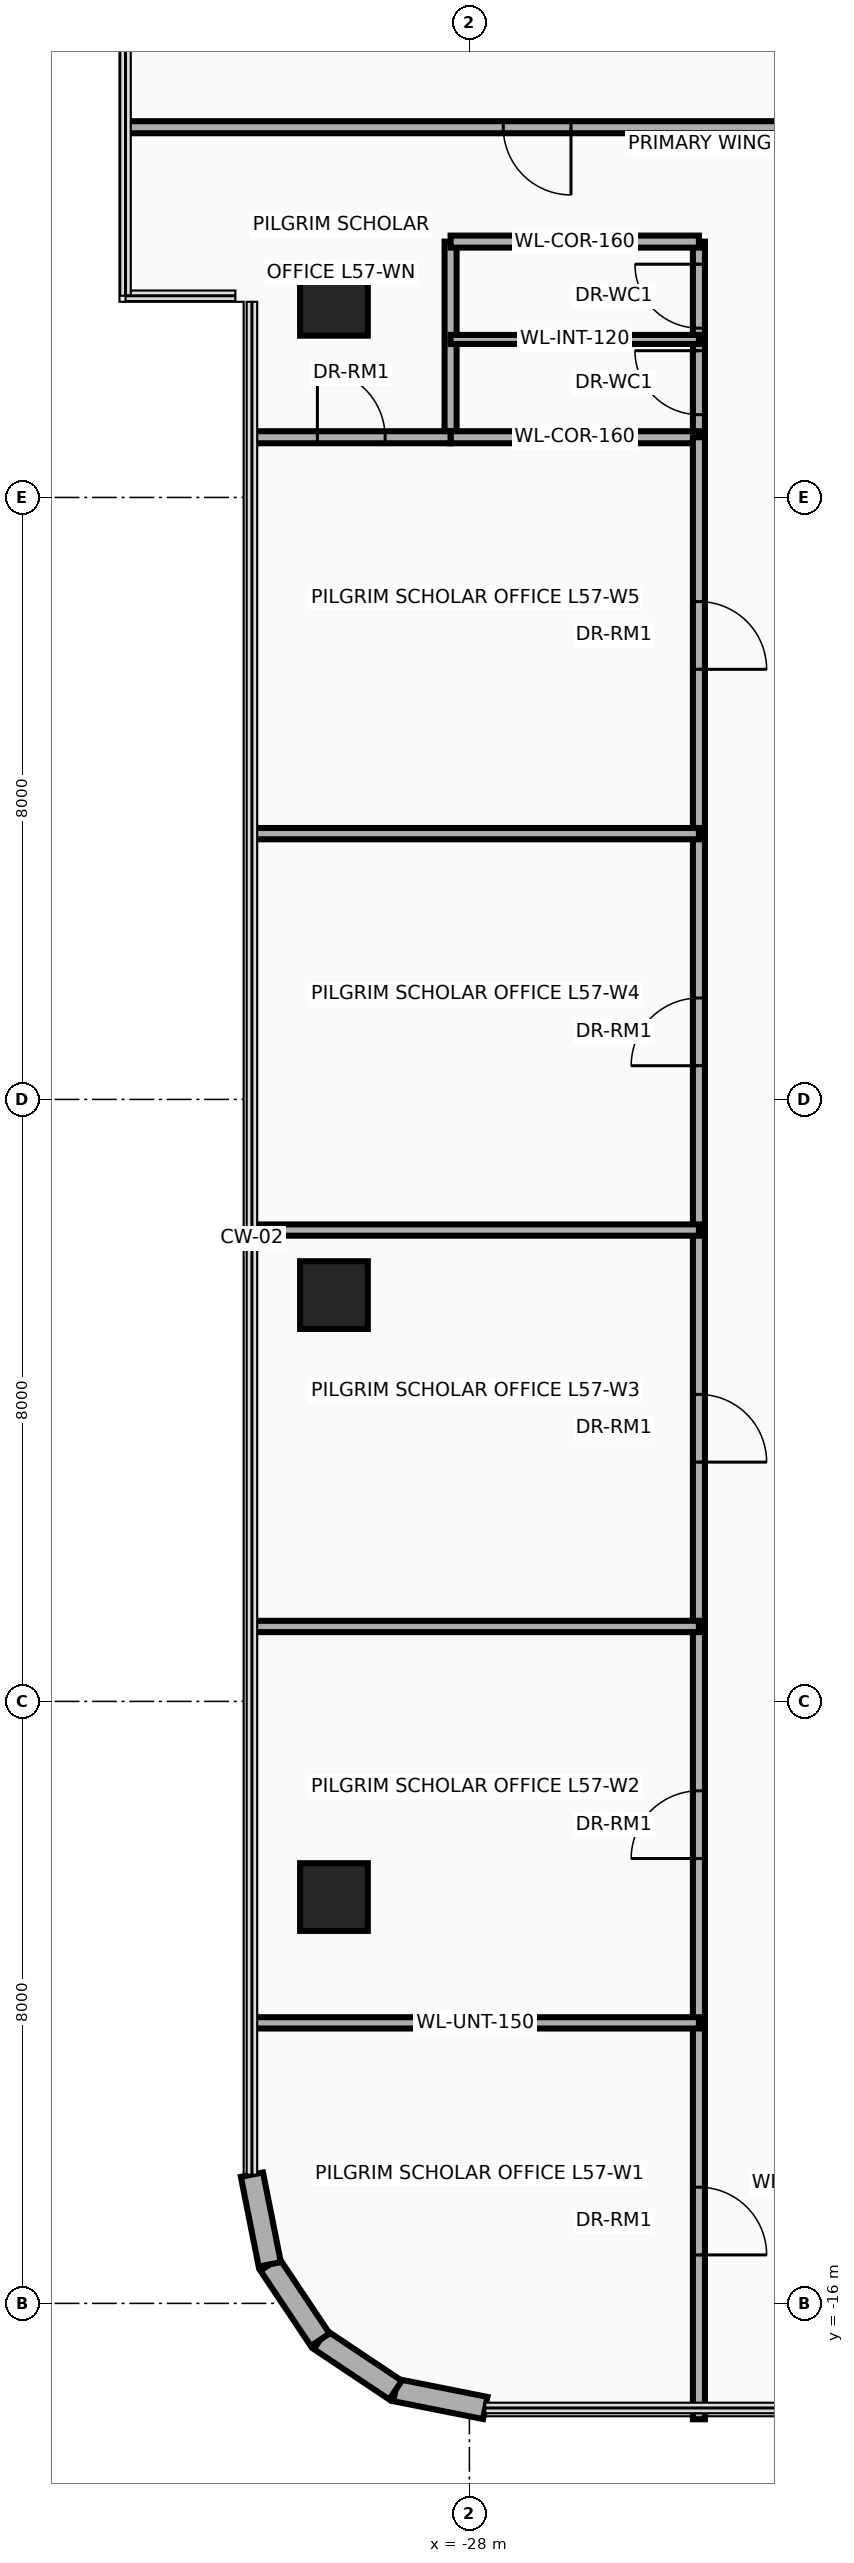
"""IFC4 building model, lengths in metres.
Left out: names, types, materials, properties, quantities, classifications, styles, units other than length and angle.
Written with IfcOpenShell. Run it as: python <this file> out.ifc"""

import sys

from ifc_helpers import new_model, si_unit, direction, frame, frame_2d, origin, origin_2d, place, context, subcontext, project, spatial, rectangle, extrude, source, transform, mapped, element, fill, save


model = new_model("IFC4")
c1 = context("Model", 3, precision=1e-05, world=origin(), true_north=direction((0.0, 1.0)))
c2 = subcontext(c1, "Body", "Model", "MODEL_VIEW")
j1 = project(units=[si_unit("LENGTHUNIT", "METRE"), si_unit("PLANEANGLEUNIT", "RADIAN")], contexts=[c1])
p1 = place(None, origin())
s1 = spatial("IfcSite", under=j1, at=p1, CompositionType="ELEMENT")
p2 = place(p1, origin())
s2 = spatial("IfcBuilding", under=s1, at=p2, CompositionType="ELEMENT")
p3 = place(p2, frame((0.0, 0.0, 223.0)))
s3 = spatial("IfcBuildingStorey", under=s2, at=p3, CompositionType="ELEMENT", Elevation=223.0)
m1 = source(origin(), c2, "Body", "SweptSolid", [
    extrude(rectangle(XDim=0.9, YDim=0.9, at=origin_2d()), origin(), (0.0, 0.0, 1.0), 3.5),
])
for number, where, z_axis, x_axis in (
    (1, (-29.8, -10.6, 0.0), (0.0, 0.0, 1.0), (1.0, 0.0, 0.0)),
    (2, (-29.8, -2.6, 0.0), (0.0, 0.0, 1.0), (1.0, 0.0, 0.0)),
    (3, (-29.8, 10.6, 0.0), (0.0, 0.0, 1.0), (1.0, 0.0, 0.0)),
):
    element("IfcColumn", number, at=place(p3, frame(where, z_axis=z_axis, x_axis=x_axis)), inside=s3, PredefinedType="COLUMN", context=c2, shape_type="MappedRepresentation", body=[
        mapped(m1, transform((0.0, 0.0, 0.0), x_axis=(1.0, 0.0, 0.0), y_axis=(0.0, 1.0, 0.0), z_axis=(0.0, 0.0, 1.0), scale=1.0)),
    ])
p4 = place(p3, frame((-27.789, -17.39, 0.0), z_axis=(0.0, 0.0, 1.0), x_axis=(-0.980804027463, 0.194996050505, 0.0)))
e4 = element("IfcWall", 4, at=p4, inside=s3, PredefinedType="SOLIDWALL", context=c2, shape_type="SweptSolid", body=[
    extrude(rectangle(XDim=1.216, YDim=0.3, at=frame_2d((0.608, 0.0))), origin(), (0.0, 0.0, 1.0), 3.26),
])
for number, where, z_axis, x_axis in (
    (5, (-28.982, -17.153, 0.0), (0.0, 0.0, 1.0), (-0.831, 0.556, 0.0)),
    (6, (-29.983, -16.483, 0.0), (0.0, 0.0, 1.0), (-0.556, 0.831, 0.0)),
):
    element("IfcWall", number, at=place(p3, frame(where, z_axis=z_axis, x_axis=x_axis)), inside=s3, PredefinedType="SOLIDWALL", context=c2, shape_type="SweptSolid", body=[
        extrude(rectangle(XDim=1.205, YDim=0.3, at=frame_2d((0.603, 0.0))), origin(), (0.0, 0.0, 1.0), 3.26),
    ])
p5 = place(p3, frame((-30.653, -15.482, 0.0), z_axis=(0.0, 0.0, 1.0), x_axis=(-0.194996050505, 0.980804027463, 0.0)))
e7 = element("IfcWall", 7, at=p5, inside=s3, PredefinedType="SOLIDWALL", context=c2, shape_type="SweptSolid", body=[
    extrude(rectangle(XDim=1.216, YDim=0.3, at=frame_2d((0.608, 0.0))), origin(), (0.0, 0.0, 1.0), 3.26),
])
p6 = place(p3, frame((-28.25, 8.8, 0.0), z_axis=(0.0, 0.0, 1.0), x_axis=(0.0, 1.0, 0.0)))
e8 = element("IfcWall", 8, at=p6, inside=s3, PredefinedType="PARTITIONING", context=c2, shape_type="SweptSolid", body=[
    extrude(rectangle(XDim=2.6, YDim=0.16, at=frame_2d((1.3, 0.0))), origin(), (0.0, 0.0, 1.0), 2.544),
])
p7 = place(p3, frame((-24.95, 8.8, 0.0), z_axis=(0.0, 0.0, 1.0), x_axis=(0.0, 1.0, 0.0)))
e9 = element("IfcWall", 9, at=p7, inside=s3, PredefinedType="PARTITIONING", context=c2, shape_type="SweptSolid", body=[
    extrude(rectangle(XDim=2.6, YDim=0.16, at=frame_2d((1.3, 0.0))), origin(), (0.0, 0.0, 1.0), 2.544),
])
p8 = place(p7, frame((0.3, 0.0, 0.0)))
e10 = element("IfcOpeningElement", 10, at=p8, cuts=e9, PredefinedType="OPENING", context=c2, shape_type="SweptSolid", body=[
    extrude(rectangle(XDim=0.85, YDim=2.1, at=frame_2d((0.425, 1.05))), frame((0.0, 0.095, 0.0), z_axis=(0.0, -1.0, 0.0), x_axis=(1.0, 0.0, 0.0)), (0.0, 0.0, 1.0), 0.19),
])
p9 = place(p7, frame((1.45, 0.0, 0.0)))
e11 = element("IfcOpeningElement", 11, at=p9, cuts=e9, PredefinedType="OPENING", context=c2, shape_type="SweptSolid", body=[
    extrude(rectangle(XDim=0.85, YDim=2.1, at=frame_2d((0.425, 1.05))), frame((0.0, 0.095, 0.0), z_axis=(0.0, -1.0, 0.0), x_axis=(1.0, 0.0, 0.0)), (0.0, 0.0, 1.0), 0.19),
])
for number, where, z_axis, x_axis in (
    (12, (-28.25, 8.8, 0.0), (0.0, 0.0, 1.0), (1.0, 0.0, 0.0)),
    (13, (-28.25, 11.4, 0.0), (0.0, 0.0, 1.0), (1.0, 0.0, 0.0)),
):
    element("IfcWall", number, at=place(p3, frame(where, z_axis=z_axis, x_axis=x_axis)), inside=s3, PredefinedType="PARTITIONING", context=c2, shape_type="SweptSolid", body=[
        extrude(rectangle(XDim=3.3, YDim=0.16, at=frame_2d((1.65, 0.0))), origin(), (0.0, 0.0, 1.0), 3.26),
    ])
p10 = place(p3, frame((-28.25, 10.1, 0.0), z_axis=(0.0, 0.0, 1.0), x_axis=(1.0, 0.0, 0.0)))
e14 = element("IfcWall", 14, at=p10, inside=s3, PredefinedType="PARTITIONING", context=c2, shape_type="SweptSolid", body=[
    extrude(rectangle(XDim=3.3, YDim=0.12, at=frame_2d((1.65, 0.0))), origin(), (0.0, 0.0, 1.0), 3.26),
])
p11 = place(p3, frame((-24.95, -17.54, 0.0), z_axis=(0.0, 0.0, 1.0), x_axis=(0.0, 1.0, 0.0)))
e15 = element("IfcWall", 15, at=p11, inside=s3, PredefinedType="PARTITIONING", context=c2, shape_type="SweptSolid", body=[
    extrude(rectangle(XDim=26.34, YDim=0.16, at=frame_2d((13.17, 0.0))), origin(), (0.0, 0.0, 1.0), 2.544),
])
p12 = place(p11, frame((2.184, 0.0, 0.0)))
e16 = element("IfcOpeningElement", 16, at=p12, cuts=e15, PredefinedType="OPENING", context=c2, shape_type="SweptSolid", body=[
    extrude(rectangle(XDim=0.9, YDim=2.1, at=frame_2d((0.45, 1.05))), frame((0.0, 0.095, 0.0), z_axis=(0.0, -1.0, 0.0), x_axis=(1.0, 0.0, 0.0)), (0.0, 0.0, 1.0), 0.19),
])
p13 = place(p11, frame((7.452, 0.0, 0.0)))
e17 = element("IfcOpeningElement", 17, at=p13, cuts=e15, PredefinedType="OPENING", context=c2, shape_type="SweptSolid", body=[
    extrude(rectangle(XDim=0.9, YDim=2.1, at=frame_2d((0.45, 1.05))), frame((0.0, 0.095, 0.0), z_axis=(0.0, -1.0, 0.0), x_axis=(1.0, 0.0, 0.0)), (0.0, 0.0, 1.0), 0.19),
])
p14 = place(p11, frame((12.72, 0.0, 0.0)))
e18 = element("IfcOpeningElement", 18, at=p14, cuts=e15, PredefinedType="OPENING", context=c2, shape_type="SweptSolid", body=[
    extrude(rectangle(XDim=0.9, YDim=2.1, at=frame_2d((0.45, 1.05))), frame((0.0, 0.095, 0.0), z_axis=(0.0, -1.0, 0.0), x_axis=(1.0, 0.0, 0.0)), (0.0, 0.0, 1.0), 0.19),
])
p15 = place(p11, frame((17.988, 0.0, 0.0)))
e19 = element("IfcOpeningElement", 19, at=p15, cuts=e15, PredefinedType="OPENING", context=c2, shape_type="SweptSolid", body=[
    extrude(rectangle(XDim=0.9, YDim=2.1, at=frame_2d((0.45, 1.05))), frame((0.0, 0.095, 0.0), z_axis=(0.0, -1.0, 0.0), x_axis=(1.0, 0.0, 0.0)), (0.0, 0.0, 1.0), 0.19),
])
p16 = place(p11, frame((23.256, 0.0, 0.0)))
e20 = element("IfcOpeningElement", 20, at=p16, cuts=e15, PredefinedType="OPENING", context=c2, shape_type="SweptSolid", body=[
    extrude(rectangle(XDim=0.9, YDim=2.1, at=frame_2d((0.45, 1.05))), frame((0.0, 0.095, 0.0), z_axis=(0.0, -1.0, 0.0), x_axis=(1.0, 0.0, 0.0)), (0.0, 0.0, 1.0), 0.19),
])
p17 = place(p3, frame((-30.89, 8.8, 0.0), z_axis=(0.0, 0.0, 1.0), x_axis=(1.0, 0.0, 0.0)))
e21 = element("IfcWall", 21, at=p17, inside=s3, PredefinedType="PARTITIONING", context=c2, shape_type="SweptSolid", body=[
    extrude(rectangle(XDim=2.64, YDim=0.16, at=frame_2d((1.32, 0.0))), origin(), (0.0, 0.0, 1.0), 2.706),
])
p18 = place(p17, frame((0.87, 0.0, 0.0)))
e22 = element("IfcOpeningElement", 22, at=p18, cuts=e21, PredefinedType="OPENING", context=c2, shape_type="SweptSolid", body=[
    extrude(rectangle(XDim=0.9, YDim=2.1, at=frame_2d((0.45, 1.05))), frame((0.0, 0.095, 0.0), z_axis=(0.0, -1.0, 0.0), x_axis=(1.0, 0.0, 0.0)), (0.0, 0.0, 1.0), 0.19),
])
p19 = place(p3, frame((-30.89, -12.272, 0.0), z_axis=(0.0, 0.0, 1.0), x_axis=(1.0, 0.0, 0.0)))
e23 = element("IfcWall", 23, at=p19, inside=s3, PredefinedType="PARTITIONING", context=c2, shape_type="SweptSolid", body=[
    extrude(rectangle(XDim=5.94, YDim=0.15, at=frame_2d((2.97, 0.0))), origin(), (0.0, 0.0, 1.0), 3.26),
])
for number, where, z_axis, x_axis in (
    (24, (-30.89, -7.004, 0.0), (0.0, 0.0, 1.0), (1.0, 0.0, 0.0)),
    (25, (-30.89, -1.736, 0.0), (0.0, 0.0, 1.0), (1.0, 0.0, 0.0)),
    (26, (-30.89, 3.532, 0.0), (0.0, 0.0, 1.0), (1.0, 0.0, 0.0)),
):
    element("IfcWall", number, at=place(p3, frame(where, z_axis=z_axis, x_axis=x_axis)), inside=s3, PredefinedType="PARTITIONING", context=c2, shape_type="SweptSolid", body=[
        extrude(rectangle(XDim=5.94, YDim=0.15, at=frame_2d((2.97, 0.0))), origin(), (0.0, 0.0, 1.0), 2.706),
    ])
p20 = place(p3, frame((-32.54, 12.92, 0.0), z_axis=(0.0, 0.0, 1.0), x_axis=(1.0, 0.0, 0.0)))
e27 = element("IfcWall", 27, at=p20, inside=s3, PredefinedType="PARTITIONING", context=c2, shape_type="SweptSolid", body=[
    extrude(rectangle(XDim=32.93, YDim=0.16, at=frame_2d((16.465, 0.0))), origin(), (0.0, 0.0, 1.0), 2.634),
])
p21 = place(p20, frame((4.99, 0.0, 0.0)))
e28 = element("IfcOpeningElement", 28, at=p21, cuts=e27, PredefinedType="OPENING", context=c2, shape_type="SweptSolid", body=[
    extrude(rectangle(XDim=0.9, YDim=2.1, at=frame_2d((0.45, 1.05))), frame((0.0, 0.095, 0.0), z_axis=(0.0, -1.0, 0.0), x_axis=(1.0, 0.0, 0.0)), (0.0, 0.0, 1.0), 0.19),
])
p22 = place(p20, frame((15.97, 0.0, 0.0)))
e29 = element("IfcOpeningElement", 29, at=p22, cuts=e27, PredefinedType="OPENING", context=c2, shape_type="SweptSolid", body=[
    extrude(rectangle(XDim=0.9, YDim=2.1, at=frame_2d((0.45, 1.05))), frame((0.0, 0.095, 0.0), z_axis=(0.0, -1.0, 0.0), x_axis=(1.0, 0.0, 0.0)), (0.0, 0.0, 1.0), 0.19),
])
p23 = place(p20, frame((26.995, 0.0, 0.0)))
e30 = element("IfcOpeningElement", 30, at=p23, cuts=e27, PredefinedType="OPENING", context=c2, shape_type="SweptSolid", body=[
    extrude(rectangle(XDim=0.9, YDim=2.1, at=frame_2d((0.45, 1.05))), frame((0.0, 0.095, 0.0), z_axis=(0.0, -1.0, 0.0), x_axis=(1.0, 0.0, 0.0)), (0.0, 0.0, 1.0), 0.19),
])
p24 = place(p8, origin())
e31 = element("IfcDoor", 31, at=p24, inside=s3, OperationType="SINGLE_SWING_RIGHT", PredefinedType="DOOR", context=c2, shape_type="SweptSolid", body=[
    extrude(rectangle(XDim=0.85, YDim=2.1, at=frame_2d((0.425, 1.05))), frame((0.0, 0.025, 0.0), z_axis=(0.0, -1.0, 0.0), x_axis=(1.0, 0.0, 0.0)), (0.0, 0.0, 1.0), 0.05),
])
fill(e10, e31)
p25 = place(p9, origin())
e32 = element("IfcDoor", 32, at=p25, inside=s3, OperationType="SINGLE_SWING_LEFT", PredefinedType="DOOR", context=c2, shape_type="SweptSolid", body=[
    extrude(rectangle(XDim=0.85, YDim=2.1, at=frame_2d((0.425, 1.05))), frame((0.0, 0.025, 0.0), z_axis=(0.0, -1.0, 0.0), x_axis=(1.0, 0.0, 0.0)), (0.0, 0.0, 1.0), 0.05),
])
fill(e11, e32)
p26 = place(p18, origin())
e33 = element("IfcDoor", 33, at=p26, inside=s3, OperationType="SINGLE_SWING_RIGHT", PredefinedType="DOOR", context=c2, shape_type="SweptSolid", body=[
    extrude(rectangle(XDim=0.9, YDim=2.1, at=frame_2d((0.45, 1.05))), frame((0.0, 0.025, 0.0), z_axis=(0.0, -1.0, 0.0), x_axis=(1.0, 0.0, 0.0)), (0.0, 0.0, 1.0), 0.05),
])
fill(e22, e33)
p27 = place(p12, frame((0.9, 0.0, 0.0), z_axis=(0.0, 0.0, 1.0), x_axis=(-1.0, 0.0, 0.0)))
e34 = element("IfcDoor", 34, at=p27, inside=s3, OperationType="SINGLE_SWING_LEFT", PredefinedType="DOOR", context=c2, shape_type="SweptSolid", body=[
    extrude(rectangle(XDim=0.9, YDim=2.1, at=frame_2d((0.45, 1.05))), frame((0.0, 0.025, 0.0), z_axis=(0.0, -1.0, 0.0), x_axis=(1.0, 0.0, 0.0)), (0.0, 0.0, 1.0), 0.05),
])
fill(e16, e34)
p28 = place(p13, origin())
e35 = element("IfcDoor", 35, at=p28, inside=s3, OperationType="SINGLE_SWING_RIGHT", PredefinedType="DOOR", context=c2, shape_type="SweptSolid", body=[
    extrude(rectangle(XDim=0.9, YDim=2.1, at=frame_2d((0.45, 1.05))), frame((0.0, 0.025, 0.0), z_axis=(0.0, -1.0, 0.0), x_axis=(1.0, 0.0, 0.0)), (0.0, 0.0, 1.0), 0.05),
])
fill(e17, e35)
p29 = place(p14, frame((0.9, 0.0, 0.0), z_axis=(0.0, 0.0, 1.0), x_axis=(-1.0, 0.0, 0.0)))
e36 = element("IfcDoor", 36, at=p29, inside=s3, OperationType="SINGLE_SWING_LEFT", PredefinedType="DOOR", context=c2, shape_type="SweptSolid", body=[
    extrude(rectangle(XDim=0.9, YDim=2.1, at=frame_2d((0.45, 1.05))), frame((0.0, 0.025, 0.0), z_axis=(0.0, -1.0, 0.0), x_axis=(1.0, 0.0, 0.0)), (0.0, 0.0, 1.0), 0.05),
])
fill(e18, e36)
p30 = place(p15, origin())
e37 = element("IfcDoor", 37, at=p30, inside=s3, OperationType="SINGLE_SWING_RIGHT", PredefinedType="DOOR", context=c2, shape_type="SweptSolid", body=[
    extrude(rectangle(XDim=0.9, YDim=2.1, at=frame_2d((0.45, 1.05))), frame((0.0, 0.025, 0.0), z_axis=(0.0, -1.0, 0.0), x_axis=(1.0, 0.0, 0.0)), (0.0, 0.0, 1.0), 0.05),
])
fill(e19, e37)
p31 = place(p16, frame((0.9, 0.0, 0.0), z_axis=(0.0, 0.0, 1.0), x_axis=(-1.0, 0.0, 0.0)))
e38 = element("IfcDoor", 38, at=p31, inside=s3, OperationType="SINGLE_SWING_LEFT", PredefinedType="DOOR", context=c2, shape_type="SweptSolid", body=[
    extrude(rectangle(XDim=0.9, YDim=2.1, at=frame_2d((0.45, 1.05))), frame((0.0, 0.025, 0.0), z_axis=(0.0, -1.0, 0.0), x_axis=(1.0, 0.0, 0.0)), (0.0, 0.0, 1.0), 0.05),
])
fill(e20, e38)
p32 = place(p21, frame((0.9, 0.0, 0.0), z_axis=(0.0, 0.0, 1.0), x_axis=(-1.0, 0.0, 0.0)))
e39 = element("IfcDoor", 39, at=p32, inside=s3, OperationType="SINGLE_SWING_LEFT", PredefinedType="DOOR", context=c2, shape_type="SweptSolid", body=[
    extrude(rectangle(XDim=0.9, YDim=2.1, at=frame_2d((0.45, 1.05))), frame((0.0, 0.025, 0.0), z_axis=(0.0, -1.0, 0.0), x_axis=(1.0, 0.0, 0.0)), (0.0, 0.0, 1.0), 0.05),
])
fill(e28, e39)
save(model, sys.argv[1])
